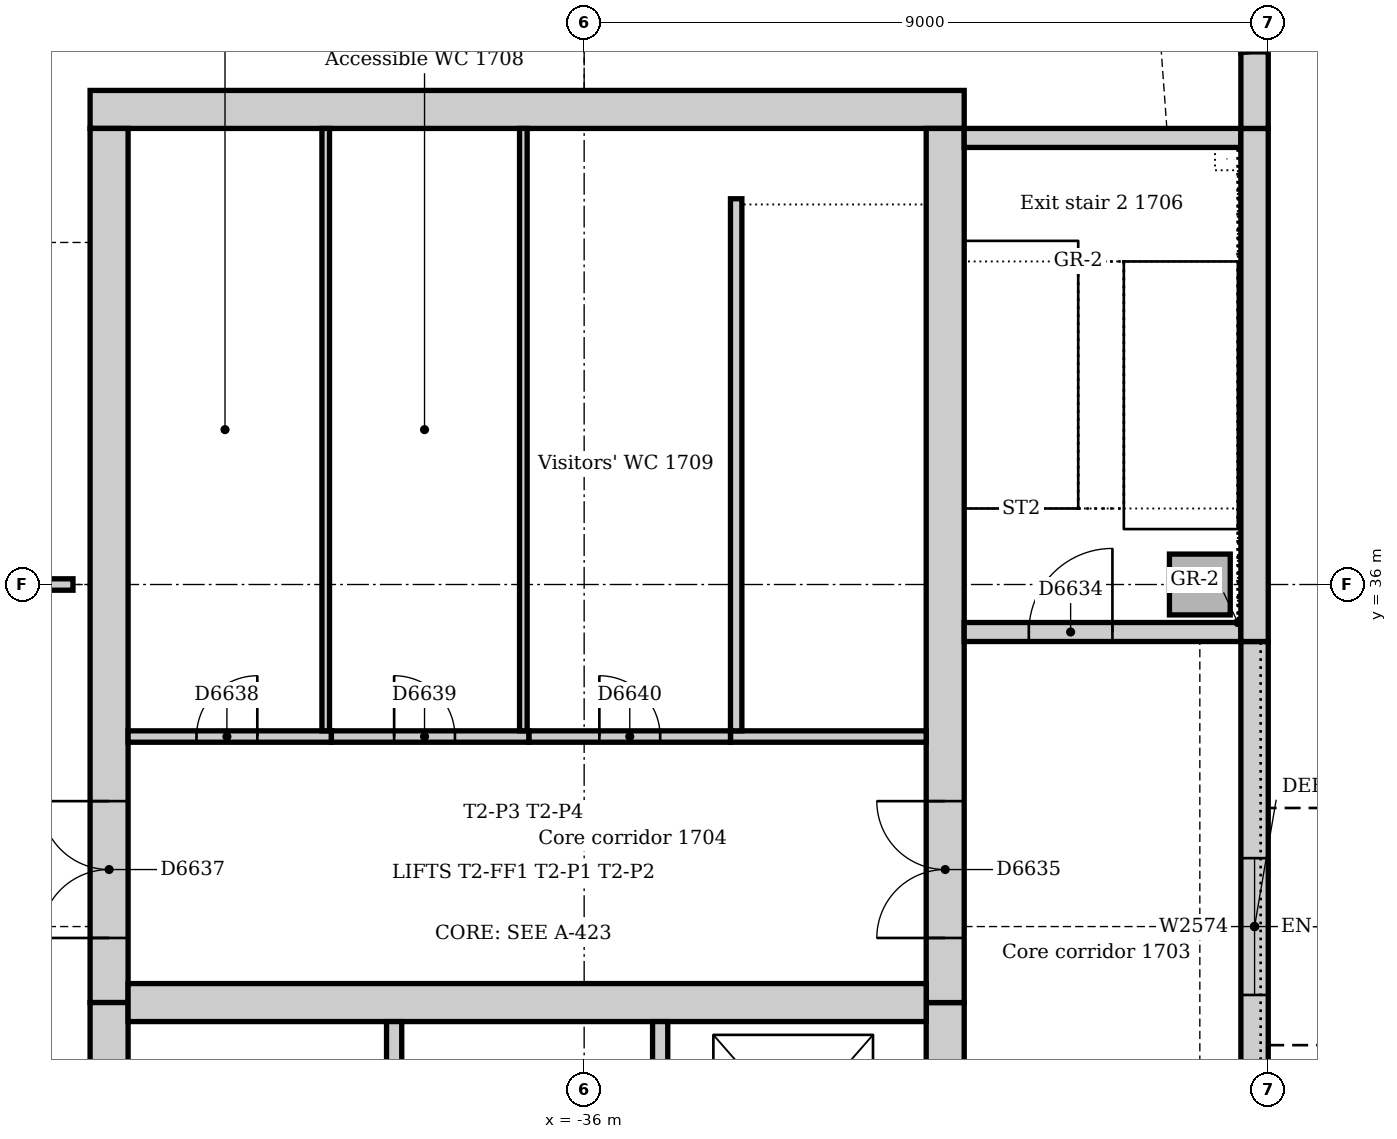
"""IFC4 building model, lengths in metres.
Left out: names, types, materials, properties, quantities, classifications, styles, units other than length and angle.
Written with IfcOpenShell. Run it as: python <this file> out.ifc"""

import sys

from ifc_helpers import new_model, si_unit, direction, frame, frame_2d, origin, origin_2d, place, context, subcontext, project, spatial, rectangle, extrude, element, fill, save


model = new_model("IFC4")
c1 = context("Model", 3, precision=1e-05, world=origin(), true_north=direction((0.0, 1.0)))
c2 = subcontext(c1, "Body", "Model", "MODEL_VIEW")
j1 = project(units=[si_unit("LENGTHUNIT", "METRE"), si_unit("PLANEANGLEUNIT", "RADIAN")], contexts=[c1])
p1 = place(None, origin())
s1 = spatial("IfcSite", under=j1, at=p1, CompositionType="ELEMENT")
p2 = place(p1, origin())
s2 = spatial("IfcBuilding", under=s1, at=p2, CompositionType="ELEMENT")
p3 = place(p2, frame((0.0, 0.0, 75.0)))
s3 = spatial("IfcBuildingStorey", under=s2, at=p3, CompositionType="ELEMENT", Elevation=75.0)
p4 = place(p3, frame((-31.0, 42.25, 0.0), z_axis=(0.0, 0.0, 1.0), x_axis=(-1.0, 0.0, 0.0)))
e1 = element("IfcWall", 1, at=p4, inside=s3, PredefinedType="SOLIDWALL", context=c2, shape_type="SweptSolid", body=[
    extrude(rectangle(XDim=11.5, YDim=0.5, at=frame_2d((5.75, 0.0))), origin(), (0.0, 0.0, 1.0), 4.0),
])
p5 = place(p3, frame((-31.25, 21.0, 0.0), z_axis=(0.0, 0.0, 1.0), x_axis=(0.0, 1.0, 0.0)))
e2 = element("IfcWall", 2, at=p5, inside=s3, PredefinedType="SOLIDWALL", context=c2, shape_type="SweptSolid", body=[
    extrude(rectangle(XDim=9.5, YDim=0.5, at=frame_2d((4.75, 0.0))), origin(), (0.0, 0.0, 1.0), 4.0),
])
p6 = place(p5, frame((5.25, 0.0, 0.0)))
e3 = element("IfcOpeningElement", 3, at=p6, cuts=e2, PredefinedType="OPENING", context=c2, shape_type="SweptSolid", body=[
    extrude(rectangle(XDim=1.0, YDim=2.1, at=frame_2d((0.5, 1.05))), frame((0.0, 0.26, 0.0), z_axis=(0.0, -1.0, 0.0), x_axis=(1.0, 0.0, 0.0)), (0.0, 0.0, 1.0), 0.52),
])
p7 = place(p3, frame((-31.25, 30.5, 0.0), z_axis=(0.0, 0.0, 1.0), x_axis=(0.0, 1.0, 0.0)))
e4 = element("IfcWall", 4, at=p7, inside=s3, PredefinedType="SOLIDWALL", context=c2, shape_type="SweptSolid", body=[
    extrude(rectangle(XDim=11.5, YDim=0.5, at=frame_2d((5.75, 0.0))), origin(), (0.0, 0.0, 1.0), 4.0),
])
p8 = place(p7, frame((0.85, 0.0, 0.0)))
e5 = element("IfcOpeningElement", 5, at=p8, cuts=e4, PredefinedType="OPENING", context=c2, shape_type="SweptSolid", body=[
    extrude(rectangle(XDim=1.8, YDim=2.1, at=frame_2d((0.9, 1.05))), frame((0.0, 0.26, 0.0), z_axis=(0.0, -1.0, 0.0), x_axis=(1.0, 0.0, 0.0)), (0.0, 0.0, 1.0), 0.52),
])
p9 = place(p3, frame((-42.25, 42.0, 0.0), z_axis=(0.0, 0.0, 1.0), x_axis=(0.0, -1.0, 0.0)))
e6 = element("IfcWall", 6, at=p9, inside=s3, PredefinedType="SOLIDWALL", context=c2, shape_type="SweptSolid", body=[
    extrude(rectangle(XDim=11.5, YDim=0.5, at=frame_2d((5.75, 0.0))), origin(), (0.0, 0.0, 1.0), 4.0),
])
p10 = place(p9, frame((8.85, 0.0, 0.0)))
e7 = element("IfcOpeningElement", 7, at=p10, cuts=e6, PredefinedType="OPENING", context=c2, shape_type="SweptSolid", body=[
    extrude(rectangle(XDim=1.8, YDim=2.1, at=frame_2d((0.9, 1.05))), frame((0.0, 0.26, 0.0), z_axis=(0.0, -1.0, 0.0), x_axis=(1.0, 0.0, 0.0)), (0.0, 0.0, 1.0), 0.52),
])
p11 = place(p3, frame((-42.25, 30.5, 0.0), z_axis=(0.0, 0.0, 1.0), x_axis=(0.0, -1.0, 0.0)))
e8 = element("IfcWall", 8, at=p11, inside=s3, PredefinedType="SOLIDWALL", context=c2, shape_type="SweptSolid", body=[
    extrude(rectangle(XDim=9.5, YDim=0.5, at=frame_2d((4.75, 0.0))), origin(), (0.0, 0.0, 1.0), 4.0),
])
p12 = place(p11, frame((3.85, 0.0, 0.0)))
e9 = element("IfcOpeningElement", 9, at=p12, cuts=e8, PredefinedType="OPENING", context=c2, shape_type="SweptSolid", body=[
    extrude(rectangle(XDim=1.8, YDim=2.1, at=frame_2d((0.9, 1.05))), frame((0.0, 0.26, 0.0), z_axis=(0.0, -1.0, 0.0), x_axis=(1.0, 0.0, 0.0)), (0.0, 0.0, 1.0), 0.52),
])
p13 = place(p3, frame((-42.0, 30.5, 0.0), z_axis=(0.0, 0.0, 1.0), x_axis=(1.0, 0.0, 0.0)))
e10 = element("IfcWall", 10, at=p13, inside=s3, PredefinedType="SOLIDWALL", context=c2, shape_type="SweptSolid", body=[
    extrude(rectangle(XDim=10.5, YDim=0.5, at=frame_2d((5.25, 0.0))), origin(), (0.0, 0.0, 1.0), 4.0),
])
p14 = place(p3, frame((-31.0, 35.375, 0.0), z_axis=(0.0, 0.0, 1.0), x_axis=(1.0, 0.0, 0.0)))
e11 = element("IfcWall", 11, at=p14, inside=s3, PredefinedType="SOLIDWALL", context=c2, shape_type="SweptSolid", body=[
    extrude(rectangle(XDim=3.64, YDim=0.25, at=frame_2d((1.82, 0.0))), origin(), (0.0, 0.0, 1.0), 4.0),
])
p15 = place(p14, frame((0.85, 0.0, 0.0)))
e12 = element("IfcOpeningElement", 12, at=p15, cuts=e11, PredefinedType="OPENING", context=c2, shape_type="SweptSolid", body=[
    extrude(rectangle(XDim=1.1, YDim=2.1, at=frame_2d((0.55, 1.05))), frame((0.0, 0.135, 0.0), z_axis=(0.0, -1.0, 0.0), x_axis=(1.0, 0.0, 0.0)), (0.0, 0.0, 1.0), 0.27),
])
p16 = place(p3, frame((-27.36, 41.875, 0.0), z_axis=(0.0, 0.0, 1.0), x_axis=(-1.0, 0.0, 0.0)))
e13 = element("IfcWall", 13, at=p16, inside=s3, PredefinedType="SOLIDWALL", context=c2, shape_type="SweptSolid", body=[
    extrude(rectangle(XDim=3.64, YDim=0.25, at=frame_2d((1.82, 0.0))), origin(), (0.0, 0.0, 1.0), 4.0),
])
p17 = place(p3, frame((-27.9, 36.0, 0.0), z_axis=(0.0, 0.0, 1.0), x_axis=(1.0, 0.0, 0.0)))
e14 = element("IfcColumn", 14, at=p17, inside=s3, PredefinedType="COLUMN", context=c2, shape_type="SweptSolid", body=[
    extrude(rectangle(XDim=0.8, YDim=0.8, at=origin_2d()), origin(), (0.0, 0.0, 1.0), 4.0),
])
p18 = place(p3, frame((-27.18, 27.75, 0.0), z_axis=(0.0, 0.0, 1.0), x_axis=(0.0, 1.0, 0.0)))
e15 = element("IfcWall", 15, at=p18, inside=s3, PredefinedType="STANDARD", context=c2, shape_type="SweptSolid", body=[
    extrude(rectangle(XDim=7.5, YDim=0.36, at=frame_2d((3.75, 0.0))), origin(), (0.0, 0.0, 1.0), 3.85),
])
p19 = place(p18, frame((2.85, 0.0, 1.2)))
e16 = element("IfcOpeningElement", 16, at=p19, cuts=e15, PredefinedType="OPENING", context=c2, shape_type="SweptSolid", body=[
    extrude(rectangle(XDim=1.8, YDim=1.2, at=frame_2d((0.9, 0.6))), frame((0.0, 0.19, 0.0), z_axis=(0.0, -1.0, 0.0), x_axis=(1.0, 0.0, 0.0)), (0.0, 0.0, 1.0), 0.38),
])
p20 = place(p3, frame((-27.18, 35.25, 0.0), z_axis=(0.0, 0.0, 1.0), x_axis=(0.0, 1.0, 0.0)))
e17 = element("IfcWall", 17, at=p20, inside=s3, PredefinedType="STANDARD", context=c2, shape_type="SweptSolid", body=[
    extrude(rectangle(XDim=6.75, YDim=0.36, at=frame_2d((3.375, 0.0))), origin(), (0.0, 0.0, 1.0), 3.85),
])
p21 = place(p3, frame((-27.18, 42.0, 0.0), z_axis=(0.0, 0.0, 1.0), x_axis=(0.0, 1.0, 0.0)))
e18 = element("IfcWall", 18, at=p21, inside=s3, PredefinedType="STANDARD", context=c2, shape_type="SweptSolid", body=[
    extrude(rectangle(XDim=1.007, YDim=0.36, at=frame_2d((0.504, 0.0))), origin(), (0.0, 0.0, 1.0), 3.85),
])
p22 = place(p3, frame((-27.183, 43.019, 0.0), z_axis=(0.0, 0.0, 1.0), x_axis=(-0.13055608231, 0.99144092581, 0.0)))
e19 = element("IfcWall", 19, at=p22, inside=s3, PredefinedType="STANDARD", context=c2, shape_type="SweptSolid", body=[
    extrude(rectangle(XDim=0.713, YDim=0.36, at=frame_2d((0.356, 0.0))), origin(), (0.0, 0.0, 1.0), 3.85),
])
for number, where, z_axis, x_axis in (
    (20, (-38.5, 27.4, 0.0), (0.0, 0.0, 1.0), (0.0, 1.0, 0.0)),
    (21, (-35.0, 27.4, 0.0), (0.0, 0.0, 1.0), (0.0, 1.0, 0.0)),
):
    element("IfcWall", number, at=place(p3, frame(where, z_axis=z_axis, x_axis=x_axis)), inside=s3, PredefinedType="SOLIDWALL", context=c2, shape_type="SweptSolid", body=[
        extrude(rectangle(XDim=2.85, YDim=0.2, at=frame_2d((1.425, 0.0))), origin(), (0.0, 0.0, 1.0), 4.0),
    ])
p23 = place(p3, frame((-34.075, 34.0, 0.0), z_axis=(0.0, 0.0, 1.0), x_axis=(1.0, 0.0, 0.0)))
e22 = element("IfcWall", 22, at=p23, inside=s3, PredefinedType="SOLIDWALL", context=c2, shape_type="SweptSolid", body=[
    extrude(rectangle(XDim=2.575, YDim=0.15, at=frame_2d((1.288, 0.0))), origin(), (0.0, 0.0, 1.0), 4.0),
])
p24 = place(p3, frame((-34.0, 41.075, 0.0), z_axis=(0.0, 0.0, 1.0), x_axis=(0.0, -1.0, 0.0)))
e23 = element("IfcWall", 23, at=p24, inside=s3, PredefinedType="SOLIDWALL", context=c2, shape_type="SweptSolid", body=[
    extrude(rectangle(XDim=7.0, YDim=0.15, at=frame_2d((3.5, 0.0))), origin(), (0.0, 0.0, 1.0), 4.0),
])
p25 = place(p3, frame((-39.325, 34.0, 0.0), z_axis=(0.0, 0.0, 1.0), x_axis=(-1.0, 0.0, 0.0)))
e24 = element("IfcWall", 24, at=p25, inside=s3, PredefinedType="PARTITIONING", context=c2, shape_type="SweptSolid", body=[
    extrude(rectangle(XDim=2.675, YDim=0.15, at=frame_2d((1.337, 0.0))), origin(), (0.0, 0.0, 1.0), 3.85),
])
p26 = place(p25, frame((0.975, 0.0, 0.0)))
e25 = element("IfcOpeningElement", 25, at=p26, cuts=e24, PredefinedType="OPENING", context=c2, shape_type="SweptSolid", body=[
    extrude(rectangle(XDim=0.8, YDim=2.1, at=frame_2d((0.4, 1.05))), frame((0.0, 0.085, 0.0), z_axis=(0.0, -1.0, 0.0), x_axis=(1.0, 0.0, 0.0)), (0.0, 0.0, 1.0), 0.17),
])
p27 = place(p3, frame((-36.725, 34.0, 0.0), z_axis=(0.0, 0.0, 1.0), x_axis=(-1.0, 0.0, 0.0)))
e26 = element("IfcWall", 26, at=p27, inside=s3, PredefinedType="PARTITIONING", context=c2, shape_type="SweptSolid", body=[
    extrude(rectangle(XDim=2.6, YDim=0.15, at=frame_2d((1.3, 0.0))), origin(), (0.0, 0.0, 1.0), 3.85),
])
p28 = place(p27, frame((0.975, 0.0, 0.0)))
e27 = element("IfcOpeningElement", 27, at=p28, cuts=e26, PredefinedType="OPENING", context=c2, shape_type="SweptSolid", body=[
    extrude(rectangle(XDim=0.8, YDim=2.1, at=frame_2d((0.4, 1.05))), frame((0.0, 0.085, 0.0), z_axis=(0.0, -1.0, 0.0), x_axis=(1.0, 0.0, 0.0)), (0.0, 0.0, 1.0), 0.17),
])
p29 = place(p3, frame((-34.075, 34.0, 0.0), z_axis=(0.0, 0.0, 1.0), x_axis=(-1.0, 0.0, 0.0)))
e28 = element("IfcWall", 28, at=p29, inside=s3, PredefinedType="PARTITIONING", context=c2, shape_type="SweptSolid", body=[
    extrude(rectangle(XDim=2.65, YDim=0.15, at=frame_2d((1.325, 0.0))), origin(), (0.0, 0.0, 1.0), 3.85),
])
p30 = place(p29, frame((0.925, 0.0, 0.0)))
e29 = element("IfcOpeningElement", 29, at=p30, cuts=e28, PredefinedType="OPENING", context=c2, shape_type="SweptSolid", body=[
    extrude(rectangle(XDim=0.8, YDim=2.1, at=frame_2d((0.4, 1.05))), frame((0.0, 0.085, 0.0), z_axis=(0.0, -1.0, 0.0), x_axis=(1.0, 0.0, 0.0)), (0.0, 0.0, 1.0), 0.17),
])
for number, where, z_axis, x_axis in (
    (30, (-39.4, 34.075, 0.0), (0.0, 0.0, 1.0), (0.0, 1.0, 0.0)),
    (31, (-36.8, 34.075, 0.0), (0.0, 0.0, 1.0), (0.0, 1.0, 0.0)),
):
    element("IfcWall", number, at=place(p3, frame(where, z_axis=z_axis, x_axis=x_axis)), inside=s3, PredefinedType="PARTITIONING", context=c2, shape_type="SweptSolid", body=[
        extrude(rectangle(XDim=7.925, YDim=0.1, at=frame_2d((3.962, 0.0))), origin(), (0.0, 0.0, 1.0), 3.85),
    ])
p31 = place(p3, frame((-44.65, 36.0, 0.0), z_axis=(0.0, 0.0, 1.0), x_axis=(1.0, 0.0, 0.0)))
e32 = element("IfcWall", 32, at=p31, inside=s3, PredefinedType="PARTITIONING", context=c2, shape_type="SweptSolid", body=[
    extrude(rectangle(XDim=1.925, YDim=0.15, at=frame_2d((0.963, 0.0))), origin(), (0.0, 0.0, 1.0), 3.602),
])
p32 = place(p31, frame((0.5, 0.0, 0.0)))
e33 = element("IfcOpeningElement", 33, at=p32, cuts=e32, PredefinedType="OPENING", context=c2, shape_type="SweptSolid", body=[
    extrude(rectangle(XDim=0.9, YDim=2.1, at=frame_2d((0.45, 1.05))), frame((0.0, 0.085, 0.0), z_axis=(0.0, -1.0, 0.0), x_axis=(1.0, 0.0, 0.0)), (0.0, 0.0, 1.0), 0.17),
])
p33 = place(p19, origin())
e34 = element("IfcWindow", 34, at=p33, inside=s3, PartitioningType="SINGLE_PANEL", PredefinedType="WINDOW", context=c2, shape_type="SweptSolid", body=[
    extrude(rectangle(XDim=1.8, YDim=1.2, at=frame_2d((0.9, 0.6))), frame((0.0, 0.13, 0.0), z_axis=(0.0, -1.0, 0.0), x_axis=(1.0, 0.0, 0.0)), (0.0, 0.0, 1.0), 0.06),
])
fill(e16, e34)
p34 = place(p15, origin())
e35 = element("IfcDoor", 35, at=p34, inside=s3, OperationType="SINGLE_SWING_RIGHT", PredefinedType="DOOR", context=c2, shape_type="SweptSolid", body=[
    extrude(rectangle(XDim=1.1, YDim=2.1, at=frame_2d((0.55, 1.05))), frame((0.0, 0.025, 0.0), z_axis=(0.0, -1.0, 0.0), x_axis=(1.0, 0.0, 0.0)), (0.0, 0.0, 1.0), 0.05),
])
fill(e12, e35)
p35 = place(p8, origin())
e36 = element("IfcDoor", 36, at=p35, inside=s3, OperationType="DOUBLE_DOOR_SINGLE_SWING", PredefinedType="DOOR", context=c2, shape_type="SweptSolid", body=[
    extrude(rectangle(XDim=1.8, YDim=2.1, at=frame_2d((0.9, 1.05))), frame((0.0, 0.025, 0.0), z_axis=(0.0, -1.0, 0.0), x_axis=(1.0, 0.0, 0.0)), (0.0, 0.0, 1.0), 0.05),
])
fill(e5, e36)
p36 = place(p10, frame((1.8, 0.0, 0.0), z_axis=(0.0, 0.0, 1.0), x_axis=(-1.0, 0.0, 0.0)))
e37 = element("IfcDoor", 37, at=p36, inside=s3, OperationType="DOUBLE_DOOR_SINGLE_SWING", PredefinedType="DOOR", context=c2, shape_type="SweptSolid", body=[
    extrude(rectangle(XDim=1.8, YDim=2.1, at=frame_2d((0.9, 1.05))), frame((0.0, 0.025, 0.0), z_axis=(0.0, -1.0, 0.0), x_axis=(1.0, 0.0, 0.0)), (0.0, 0.0, 1.0), 0.05),
])
fill(e7, e37)
p37 = place(p26, frame((0.8, 0.0, 0.0), z_axis=(0.0, 0.0, 1.0), x_axis=(-1.0, 0.0, 0.0)))
e38 = element("IfcDoor", 38, at=p37, inside=s3, OperationType="SINGLE_SWING_RIGHT", PredefinedType="DOOR", context=c2, shape_type="SweptSolid", body=[
    extrude(rectangle(XDim=0.8, YDim=2.1, at=frame_2d((0.4, 1.05))), frame((0.0, 0.025, 0.0), z_axis=(0.0, -1.0, 0.0), x_axis=(1.0, 0.0, 0.0)), (0.0, 0.0, 1.0), 0.05),
])
fill(e25, e38)
p38 = place(p28, frame((0.8, 0.0, 0.0), z_axis=(0.0, 0.0, 1.0), x_axis=(-1.0, 0.0, 0.0)))
e39 = element("IfcDoor", 39, at=p38, inside=s3, OperationType="SINGLE_SWING_LEFT", PredefinedType="DOOR", context=c2, shape_type="SweptSolid", body=[
    extrude(rectangle(XDim=0.8, YDim=2.1, at=frame_2d((0.4, 1.05))), frame((0.0, 0.025, 0.0), z_axis=(0.0, -1.0, 0.0), x_axis=(1.0, 0.0, 0.0)), (0.0, 0.0, 1.0), 0.05),
])
fill(e27, e39)
p39 = place(p30, frame((0.8, 0.0, 0.0), z_axis=(0.0, 0.0, 1.0), x_axis=(-1.0, 0.0, 0.0)))
e40 = element("IfcDoor", 40, at=p39, inside=s3, OperationType="SINGLE_SWING_LEFT", PredefinedType="DOOR", context=c2, shape_type="SweptSolid", body=[
    extrude(rectangle(XDim=0.8, YDim=2.1, at=frame_2d((0.4, 1.05))), frame((0.0, 0.025, 0.0), z_axis=(0.0, -1.0, 0.0), x_axis=(1.0, 0.0, 0.0)), (0.0, 0.0, 1.0), 0.05),
])
fill(e29, e40)
save(model, sys.argv[1])
